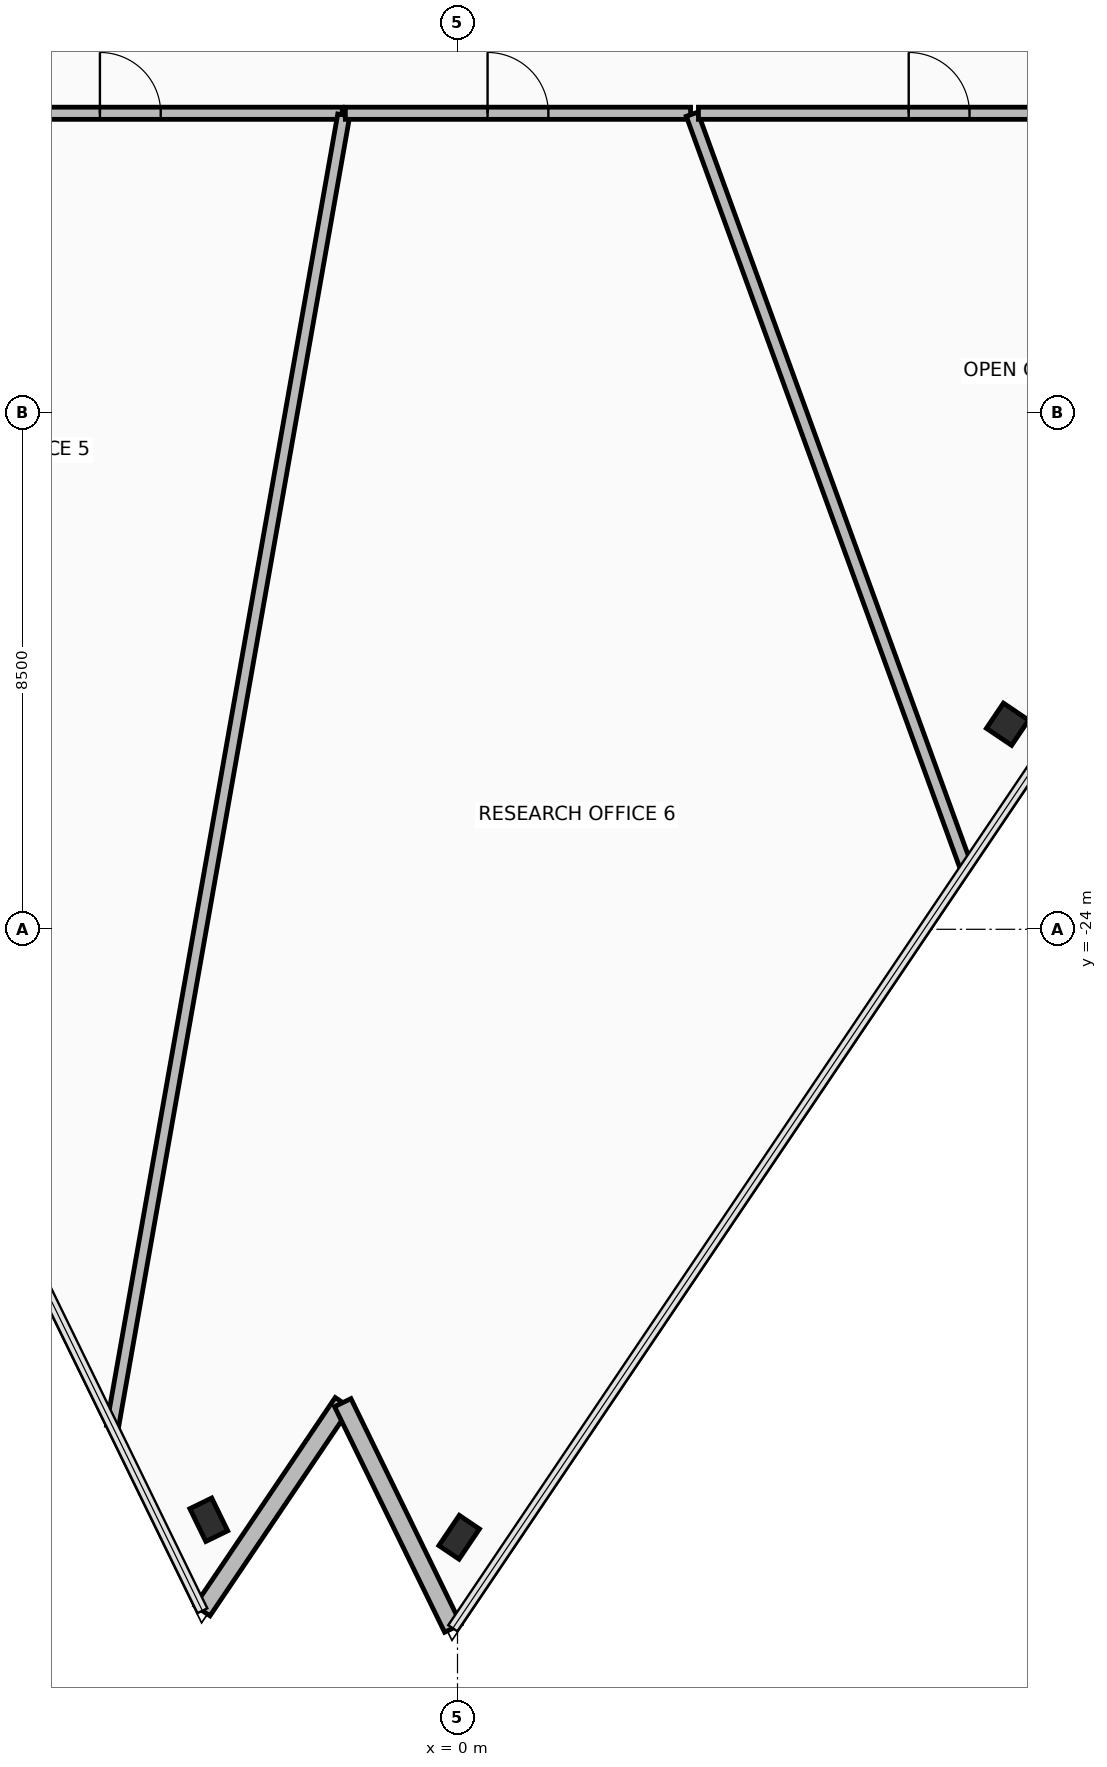
"""IFC4 building model, lengths in metres.
Left out: names, types, materials, properties, quantities, classifications, styles, units other than length and angle.
Written with IfcOpenShell. Run it as: python <this file> out.ifc"""

import sys

from ifc_helpers import new_model, si_unit, direction, frame, frame_2d, origin, origin_2d, place, context, subcontext, project, spatial, rectangle, hollow_rectangle, extrude, element, fill, save


model = new_model("IFC4")
c1 = context("Model", 3, precision=1e-05, world=origin(), true_north=direction((0.0, 1.0)))
c2 = subcontext(c1, "Body", "Model", "MODEL_VIEW")
j1 = project(units=[si_unit("LENGTHUNIT", "METRE"), si_unit("PLANEANGLEUNIT", "RADIAN")], contexts=[c1])
p1 = place(None, origin())
s1 = spatial("IfcSite", under=j1, at=p1, CompositionType="ELEMENT")
p2 = place(p1, origin())
s2 = spatial("IfcBuilding", under=s1, at=p2, CompositionType="ELEMENT")
p3 = place(p2, frame((0.0, 0.0, 237.85)))
s3 = spatial("IfcBuildingStorey", under=s2, at=p3, CompositionType="ELEMENT", Elevation=237.85)
for number, where, z_axis, x_axis in (
    (1, (-4.091, -33.71, 0.0), (0.0, 0.0, 1.0), (-0.438, 0.899, 0.0)),
    (2, (0.027, -33.998, 0.0), (0.0, 0.0, 1.0), (0.559, 0.829, 0.0)),
):
    element("IfcColumn", number, at=place(p3, frame(where, z_axis=z_axis, x_axis=x_axis)), inside=s3, PredefinedType="COLUMN", context=c2, shape_type="SweptSolid", body=[
        extrude(hollow_rectangle(XDim=0.4, YDim=0.6, WallThickness=0.03, at=origin_2d()), origin(), (0.0, 0.0, 1.0), 3.6),
    ])
p4 = place(p3, frame((9.046, -20.628, 0.0), z_axis=(0.0, 0.0, 1.0), x_axis=(0.559194350413, 0.829036596578, 0.0)))
e3 = element("IfcColumn", 3, at=p4, inside=s3, PredefinedType="COLUMN", context=c2, shape_type="SweptSolid", body=[
    extrude(hollow_rectangle(XDim=0.5, YDim=0.5, WallThickness=0.032, at=origin_2d()), origin(), (0.0, 0.0, 1.0), 3.6),
])
p5 = place(p3, frame((-4.195, -35.207, 0.0), z_axis=(0.0, 0.0, 1.0), x_axis=(0.559182319101, 0.829044711704, 0.0)))
e4 = element("IfcWall", 4, at=p5, inside=s3, PredefinedType="STANDARD", context=c2, shape_type="SweptSolid", body=[
    extrude(rectangle(XDim=4.128, YDim=0.3, at=frame_2d((2.064, 0.0))), origin(), (0.0, 0.0, 1.0), 2.765),
])
p6 = place(p3, frame((-1.887, -31.784, 0.0), z_axis=(0.0, 0.0, 1.0), x_axis=(0.438367699713, -0.898795727542, 0.0)))
e5 = element("IfcWall", 5, at=p6, inside=s3, PredefinedType="STANDARD", context=c2, shape_type="SweptSolid", body=[
    extrude(rectangle(XDim=4.128, YDim=0.3, at=frame_2d((2.064, 0.0))), origin(), (0.0, 0.0, 1.0), 2.765),
])
p7 = place(p3, frame((-8.866, -10.58, 0.0), z_axis=(0.0, 0.0, 1.0), x_axis=(1.0, 0.0, 0.0)))
e6 = element("IfcWall", 6, at=p7, inside=s3, PredefinedType="PARTITIONING", context=c2, shape_type="SweptSolid", body=[
    extrude(rectangle(XDim=6.971, YDim=0.2, at=frame_2d((3.485, 0.0))), origin(), (0.0, 0.0, 1.0), 2.915),
])
p8 = place(p7, frame((2.985, 0.0, 0.0)))
e7 = element("IfcOpeningElement", 7, at=p8, cuts=e6, PredefinedType="OPENING", context=c2, shape_type="SweptSolid", body=[
    extrude(rectangle(XDim=1.0, YDim=2.15, at=frame_2d((0.5, 1.075))), frame((0.0, 0.11, 0.0), z_axis=(0.0, -1.0, 0.0), x_axis=(1.0, 0.0, 0.0)), (0.0, 0.0, 1.0), 0.22),
])
p9 = place(p3, frame((-1.871, -10.609, 0.0), z_axis=(0.0, 0.0, 1.0), x_axis=(-0.173658771841, -0.984805884915, 0.0)))
e8 = element("IfcWall", 8, at=p9, inside=s3, PredefinedType="PARTITIONING", context=c2, shape_type="SweptSolid", body=[
    extrude(rectangle(XDim=21.899, YDim=0.2, at=frame_2d((10.95, 0.0))), origin(), (0.0, 0.0, 1.0), 2.765),
])
p10 = place(p3, frame((-1.844, -10.58, 0.0), z_axis=(0.0, 0.0, 1.0), x_axis=(1.0, 0.0, 0.0)))
e9 = element("IfcWall", 9, at=p10, inside=s3, PredefinedType="PARTITIONING", context=c2, shape_type="SweptSolid", body=[
    extrude(rectangle(XDim=5.678, YDim=0.2, at=frame_2d((2.839, 0.0))), origin(), (0.0, 0.0, 1.0), 3.42),
])
p11 = place(p10, frame((2.339, 0.0, 0.0)))
e10 = element("IfcOpeningElement", 10, at=p11, cuts=e9, PredefinedType="OPENING", context=c2, shape_type="SweptSolid", body=[
    extrude(rectangle(XDim=1.0, YDim=2.15, at=frame_2d((0.5, 1.075))), frame((0.0, 0.11, 0.0), z_axis=(0.0, -1.0, 0.0), x_axis=(1.0, 0.0, 0.0)), (0.0, 0.0, 1.0), 0.22),
])
p12 = place(p3, frame((3.857, -10.596, 0.0), z_axis=(0.0, 0.0, 1.0), x_axis=(0.342028925495, -0.939689424291, 0.0)))
e11 = element("IfcWall", 11, at=p12, inside=s3, PredefinedType="PARTITIONING", context=c2, shape_type="SweptSolid", body=[
    extrude(rectangle(XDim=13.165, YDim=0.2, at=frame_2d((6.583, 0.0))), origin(), (0.0, 0.0, 1.0), 2.765),
])
p13 = place(p3, frame((3.963, -10.58, 0.0), z_axis=(0.0, 0.0, 1.0), x_axis=(1.0, 0.0, 0.0)))
e12 = element("IfcWall", 12, at=p13, inside=s3, PredefinedType="PARTITIONING", context=c2, shape_type="SweptSolid", body=[
    extrude(rectangle(XDim=7.917, YDim=0.2, at=frame_2d((3.958, 0.0))), origin(), (0.0, 0.0, 1.0), 2.915),
])
p14 = place(p13, frame((3.458, 0.0, 0.0)))
e13 = element("IfcOpeningElement", 13, at=p14, cuts=e12, PredefinedType="OPENING", context=c2, shape_type="SweptSolid", body=[
    extrude(rectangle(XDim=1.0, YDim=2.15, at=frame_2d((0.5, 1.075))), frame((0.0, 0.11, 0.0), z_axis=(0.0, -1.0, 0.0), x_axis=(1.0, 0.0, 0.0)), (0.0, 0.0, 1.0), 0.22),
])
p15 = place(p8, origin())
e14 = element("IfcDoor", 14, at=p15, inside=s3, OperationType="SINGLE_SWING_RIGHT", PredefinedType="DOOR", context=c2, shape_type="SweptSolid", body=[
    extrude(rectangle(XDim=1.0, YDim=2.15, at=frame_2d((0.5, 1.075))), frame((0.0, 0.025, 0.0), z_axis=(0.0, -1.0, 0.0), x_axis=(1.0, 0.0, 0.0)), (0.0, 0.0, 1.0), 0.05),
])
fill(e7, e14)
p16 = place(p11, origin())
e15 = element("IfcDoor", 15, at=p16, inside=s3, OperationType="SINGLE_SWING_RIGHT", PredefinedType="DOOR", context=c2, shape_type="SweptSolid", body=[
    extrude(rectangle(XDim=1.0, YDim=2.15, at=frame_2d((0.5, 1.075))), frame((0.0, 0.025, 0.0), z_axis=(0.0, -1.0, 0.0), x_axis=(1.0, 0.0, 0.0)), (0.0, 0.0, 1.0), 0.05),
])
fill(e10, e15)
p17 = place(p14, origin())
e16 = element("IfcDoor", 16, at=p17, inside=s3, OperationType="SINGLE_SWING_RIGHT", PredefinedType="DOOR", context=c2, shape_type="SweptSolid", body=[
    extrude(rectangle(XDim=1.0, YDim=2.15, at=frame_2d((0.5, 1.075))), frame((0.0, 0.025, 0.0), z_axis=(0.0, -1.0, 0.0), x_axis=(1.0, 0.0, 0.0)), (0.0, 0.0, 1.0), 0.05),
])
fill(e13, e16)
save(model, sys.argv[1])
